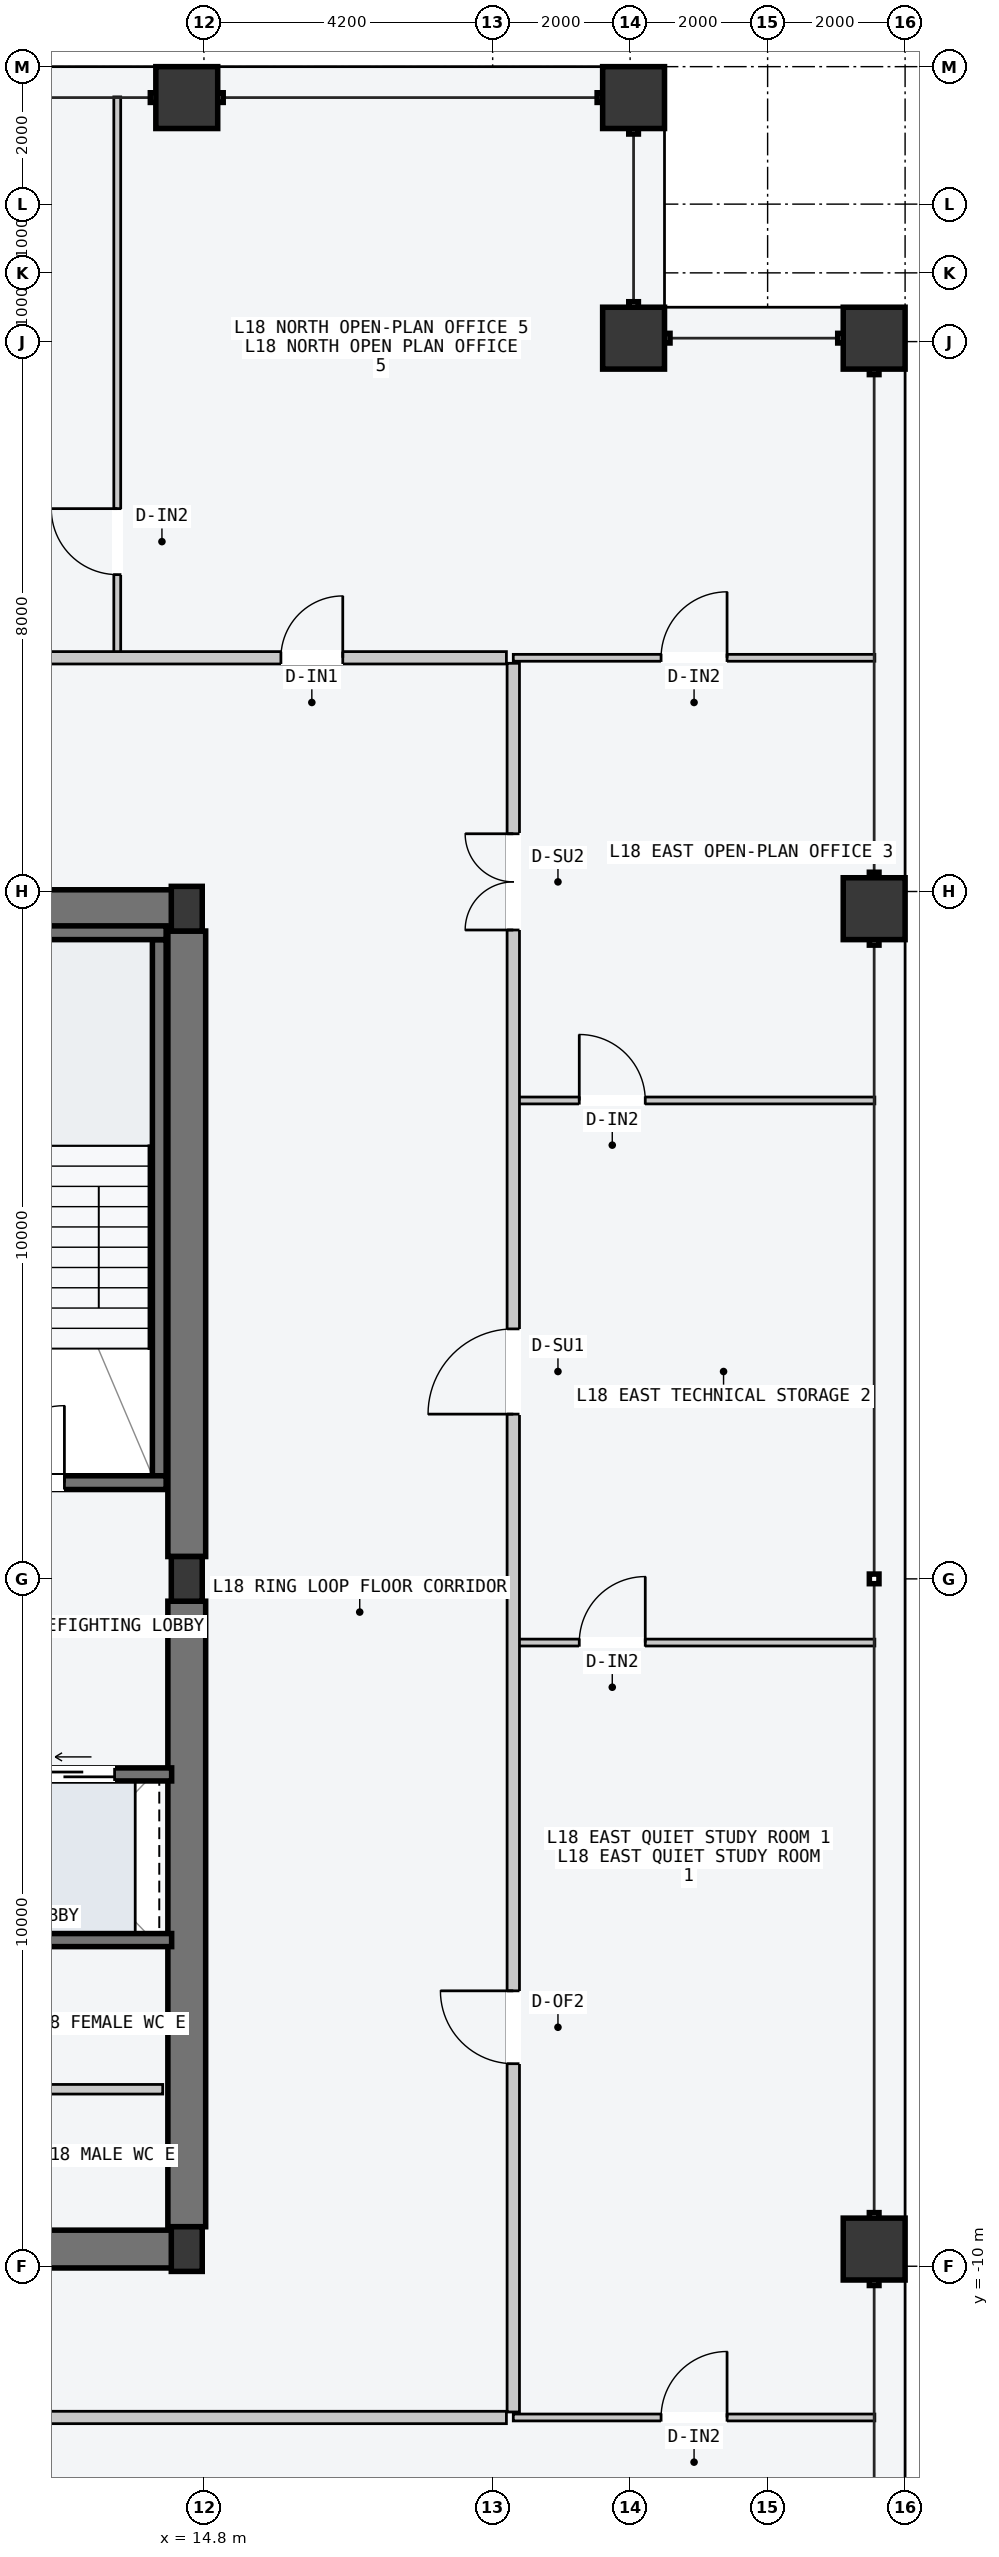
"""IFC4 building model, lengths in metres.
Left out: names, types, materials, properties, quantities, classifications, styles, units other than length and angle.
Written with IfcOpenShell. Run it as: python <this file> out.ifc"""

import sys

from ifc_helpers import new_model, si_unit, direction, frame, frame_2d, origin, origin_2d, place, context, subcontext, project, spatial, rectangle, hollow_rectangle, i_section, extrude, element, fill, save


model = new_model("IFC4")
c1 = context("Model", 3, precision=1e-05, world=origin(), true_north=direction((0.0, 1.0)))
c2 = subcontext(c1, "Body", "Model", "MODEL_VIEW")
j1 = project(units=[si_unit("LENGTHUNIT", "METRE"), si_unit("PLANEANGLEUNIT", "RADIAN")], contexts=[c1])
p1 = place(None, origin())
s1 = spatial("IfcSite", under=j1, at=p1, CompositionType="ELEMENT")
p2 = place(p1, origin())
s2 = spatial("IfcBuilding", under=s1, at=p2, CompositionType="ELEMENT")
p3 = place(p2, frame((0.0, 0.0, 70.8)))
s3 = spatial("IfcBuildingStorey", under=s2, at=p3, CompositionType="ELEMENT", Elevation=70.8)
for number, where, z_axis, x_axis in (
    (1, (8.07, -9.75, -0.2), (0.0, 0.0, 1.0), (1.0, 0.0, 0.0)),
    (2, (8.07, 9.75, -0.2), (0.0, 0.0, 1.0), (1.0, 0.0, 0.0)),
):
    element("IfcWall", number, at=place(p3, frame(where, z_axis=z_axis, x_axis=x_axis)), inside=s3, PredefinedType="SHEAR", context=c2, shape_type="SweptSolid", body=[
        extrude(rectangle(XDim=6.46, YDim=0.55, at=frame_2d((3.23, 0.0))), origin(), (0.0, 0.0, 1.0), 3.6),
    ])
for number, where, z_axis, x_axis in (
    (3, (14.55, -9.425, -0.2), (0.0, 0.0, 1.0), (0.0, 1.0, 0.0)),
    (4, (14.55, 0.325, -0.2), (0.0, 0.0, 1.0), (0.0, 1.0, 0.0)),
):
    element("IfcWall", number, at=place(p3, frame(where, z_axis=z_axis, x_axis=x_axis)), inside=s3, PredefinedType="SHEAR", context=c2, shape_type="SweptSolid", body=[
        extrude(rectangle(XDim=9.1, YDim=0.55, at=frame_2d((4.55, 0.0))), origin(), (0.0, 0.0, 1.0), 3.6),
    ])
p4 = place(p3, frame((14.15, 1.5, -0.2), z_axis=(0.0, 0.0, 1.0), x_axis=(0.0, 1.0, 0.0)))
e5 = element("IfcWall", 5, at=p4, inside=s3, PredefinedType="SOLIDWALL", context=c2, shape_type="SweptSolid", body=[
    extrude(rectangle(XDim=7.8, YDim=0.2, at=frame_2d((3.9, 0.0))), origin(), (0.0, 0.0, 1.0), 3.6),
])
p5 = place(p3, frame((10.15, 1.4, -0.2), z_axis=(0.0, 0.0, 1.0), x_axis=(1.0, 0.0, 0.0)))
e6 = element("IfcWall", 6, at=p5, inside=s3, PredefinedType="SOLIDWALL", context=c2, shape_type="SweptSolid", body=[
    extrude(rectangle(XDim=4.1, YDim=0.2, at=frame_2d((2.05, 0.0))), origin(), (0.0, 0.0, 1.0), 3.6),
])
p6 = place(p5, frame((1.5, 0.0, 0.2)))
e7 = element("IfcOpeningElement", 7, at=p6, cuts=e6, PredefinedType="OPENING", context=c2, shape_type="SweptSolid", body=[
    extrude(rectangle(XDim=1.12, YDim=2.18, at=frame_2d((0.56, 1.09))), frame((0.0, 0.11, 0.0), z_axis=(0.0, -1.0, 0.0), x_axis=(1.0, 0.0, 0.0)), (0.0, 0.0, 1.0), 0.22),
])
p7 = place(p3, frame((10.15, 9.4, -0.2), z_axis=(0.0, 0.0, 1.0), x_axis=(1.0, 0.0, 0.0)))
e8 = element("IfcWall", 8, at=p7, inside=s3, PredefinedType="SOLIDWALL", context=c2, shape_type="SweptSolid", body=[
    extrude(rectangle(XDim=4.1, YDim=0.2, at=frame_2d((2.05, 0.0))), origin(), (0.0, 0.0, 1.0), 3.6),
])
for number, where, z_axis, x_axis in (
    (9, (14.55, -9.75, 0.0), (0.0, 0.0, 1.0), (1.0, 0.0, 0.0)),
    (10, (14.55, 0.0, 0.0), (0.0, 0.0, 1.0), (1.0, 0.0, 0.0)),
    (11, (14.55, 9.75, 0.0), (0.0, 0.0, 1.0), (1.0, 0.0, 0.0)),
):
    element("IfcColumn", number, at=place(p3, frame(where, z_axis=z_axis, x_axis=x_axis)), inside=s3, PredefinedType="COLUMN", context=c2, shape_type="SweptSolid", body=[
        extrude(i_section(OverallWidth=0.45, OverallDepth=0.65, WebThickness=0.025, FlangeThickness=0.04, at=origin_2d()), origin(), (0.0, 0.0, 1.0), 3.6),
    ])
for number, where, z_axis, x_axis in (
    (12, (14.55, 21.55, 0.0), (0.0, 0.0, 1.0), (1.0, 0.0, 0.0)),
    (13, (21.05, 21.55, 0.0), (0.0, 0.0, 1.0), (1.0, 0.0, 0.0)),
    (14, (24.55, -9.75, 0.0), (0.0, 0.0, 1.0), (0.0, 1.0, 0.0)),
    (15, (24.55, 9.75, 0.0), (0.0, 0.0, 1.0), (0.0, 1.0, 0.0)),
    (16, (24.55, 18.05, 0.0), (0.0, 0.0, 1.0), (0.0, 1.0, 0.0)),
    (17, (21.05, 18.05, 0.0), (0.0, 0.0, 1.0), (1.0, 0.0, 0.0)),
):
    element("IfcColumn", number, at=place(p3, frame(where, z_axis=z_axis, x_axis=x_axis)), inside=s3, PredefinedType="COLUMN", context=c2, shape_type="SweptSolid", body=[
        extrude(hollow_rectangle(XDim=0.9, YDim=0.9, WallThickness=0.045, at=origin_2d()), origin(), (0.0, 0.0, 1.0), 3.6),
    ])
p8 = place(p3, frame((11.65, -2.845, -0.2), z_axis=(0.0, 0.0, 1.0), x_axis=(1.0, 0.0, 0.0)))
e18 = element("IfcWall", 18, at=p8, inside=s3, PredefinedType="SOLIDWALL", context=c2, shape_type="SweptSolid", body=[
    extrude(rectangle(XDim=2.68, YDim=0.19, at=frame_2d((1.34, 0.0))), origin(), (0.0, 0.0, 1.0), 3.6),
])
p9 = place(p8, frame((0.65, 0.0, 0.2)))
e19 = element("IfcOpeningElement", 19, at=p9, cuts=e18, PredefinedType="OPENING", context=c2, shape_type="SweptSolid", body=[
    extrude(rectangle(XDim=1.2, YDim=2.2, at=frame_2d((0.6, 1.1))), frame((0.0, 0.105, 0.0), z_axis=(0.0, -1.0, 0.0), x_axis=(1.0, 0.0, 0.0)), (0.0, 0.0, 1.0), 0.21),
])
p10 = place(p3, frame((11.65, -5.255, -0.2), z_axis=(0.0, 0.0, 1.0), x_axis=(1.0, 0.0, 0.0)))
e20 = element("IfcWall", 20, at=p10, inside=s3, PredefinedType="SOLIDWALL", context=c2, shape_type="SweptSolid", body=[
    extrude(rectangle(XDim=2.68, YDim=0.19, at=frame_2d((1.34, 0.0))), origin(), (0.0, 0.0, 1.0), 3.6),
])
p11 = place(p3, frame((11.7, -7.425, 0.0), z_axis=(0.0, 0.0, 1.0), x_axis=(1.0, 0.0, 0.0)))
e21 = element("IfcWall", 21, at=p11, inside=s3, PredefinedType="PARTITIONING", context=c2, shape_type="SweptSolid", body=[
    extrude(rectangle(XDim=2.5, YDim=0.14, at=frame_2d((1.25, 0.0))), origin(), (0.0, 0.0, 1.0), 3.4),
])
p12 = place(p3, frame((13.539, 13.46, 0.0), z_axis=(0.0, 0.0, 1.0), x_axis=(0.0, 1.0, 0.0)))
e22 = element("IfcWall", 22, at=p12, inside=s3, PredefinedType="PARTITIONING", context=c2, shape_type="SweptSolid", body=[
    extrude(rectangle(XDim=8.1, YDim=0.1, at=frame_2d((4.05, 0.0))), origin(), (0.0, 0.0, 1.0), 3.4),
])
p13 = place(p12, frame((1.15, 0.0, 0.0)))
e23 = element("IfcOpeningElement", 23, at=p13, cuts=e22, PredefinedType="OPENING", context=c2, shape_type="SweptSolid", body=[
    extrude(rectangle(XDim=0.96, YDim=2.18, at=frame_2d((0.48, 1.09))), frame((0.0, 0.06, 0.0), z_axis=(0.0, -1.0, 0.0), x_axis=(1.0, 0.0, 0.0)), (0.0, 0.0, 1.0), 0.12),
])
p14 = place(p3, frame((-19.2, 13.4, 0.0), z_axis=(0.0, 0.0, 1.0), x_axis=(1.0, 0.0, 0.0)))
e24 = element("IfcWall", 24, at=p14, inside=s3, PredefinedType="PARTITIONING", context=c2, shape_type="SweptSolid", body=[
    extrude(rectangle(XDim=38.4, YDim=0.18, at=frame_2d((19.2, 0.0))), origin(), (0.0, 0.0, 1.0), 3.4),
])
p15 = place(p14, frame((4.113, 0.0, 0.0)))
e25 = element("IfcOpeningElement", 25, at=p15, cuts=e24, PredefinedType="OPENING", context=c2, shape_type="SweptSolid", body=[
    extrude(rectangle(XDim=1.02, YDim=2.2, at=frame_2d((0.51, 1.1))), frame((0.0, 0.1, 0.0), z_axis=(0.0, -1.0, 0.0), x_axis=(1.0, 0.0, 0.0)), (0.0, 0.0, 1.0), 0.2),
])
p16 = place(p14, frame((13.095, 0.0, 0.0)))
e26 = element("IfcOpeningElement", 26, at=p16, cuts=e24, PredefinedType="OPENING", context=c2, shape_type="SweptSolid", body=[
    extrude(rectangle(XDim=1.06, YDim=2.2, at=frame_2d((0.53, 1.1))), frame((0.0, 0.1, 0.0), z_axis=(0.0, -1.0, 0.0), x_axis=(1.0, 0.0, 0.0)), (0.0, 0.0, 1.0), 0.2),
])
p17 = place(p14, frame((21.168, 0.0, 0.0)))
e27 = element("IfcOpeningElement", 27, at=p17, cuts=e24, PredefinedType="OPENING", context=c2, shape_type="SweptSolid", body=[
    extrude(rectangle(XDim=1.24, YDim=2.24, at=frame_2d((0.62, 1.12))), frame((0.0, 0.1, 0.0), z_axis=(0.0, -1.0, 0.0), x_axis=(1.0, 0.0, 0.0)), (0.0, 0.0, 1.0), 0.2),
])
p18 = place(p14, frame((28.455, 0.0, 0.0)))
e28 = element("IfcOpeningElement", 28, at=p18, cuts=e24, PredefinedType="OPENING", context=c2, shape_type="SweptSolid", body=[
    extrude(rectangle(XDim=1.4, YDim=2.2, at=frame_2d((0.7, 1.1))), frame((0.0, 0.1, 0.0), z_axis=(0.0, -1.0, 0.0), x_axis=(1.0, 0.0, 0.0)), (0.0, 0.0, 1.0), 0.2),
])
p19 = place(p14, frame((35.119, 0.0, 0.0)))
e29 = element("IfcOpeningElement", 29, at=p19, cuts=e24, PredefinedType="OPENING", context=c2, shape_type="SweptSolid", body=[
    extrude(rectangle(XDim=0.9, YDim=2.15, at=frame_2d((0.45, 1.075))), frame((0.0, 0.1, 0.0), z_axis=(0.0, -1.0, 0.0), x_axis=(1.0, 0.0, 0.0)), (0.0, 0.0, 1.0), 0.2),
])
p20 = place(p3, frame((19.3, 13.4, 0.0), z_axis=(0.0, 0.0, 1.0), x_axis=(1.0, 0.0, 0.0)))
e30 = element("IfcWall", 30, at=p20, inside=s3, PredefinedType="PARTITIONING", context=c2, shape_type="SweptSolid", body=[
    extrude(rectangle(XDim=5.26, YDim=0.1, at=frame_2d((2.63, 0.0))), origin(), (0.0, 0.0, 1.0), 3.4),
])
p21 = place(p20, frame((2.15, 0.0, 0.0)))
e31 = element("IfcOpeningElement", 31, at=p21, cuts=e30, PredefinedType="OPENING", context=c2, shape_type="SweptSolid", body=[
    extrude(rectangle(XDim=0.96, YDim=2.18, at=frame_2d((0.48, 1.09))), frame((0.0, 0.06, 0.0), z_axis=(0.0, -1.0, 0.0), x_axis=(1.0, 0.0, 0.0)), (0.0, 0.0, 1.0), 0.12),
])
p22 = place(p3, frame((-19.2, -12.2, 0.0), z_axis=(0.0, 0.0, 1.0), x_axis=(1.0, 0.0, 0.0)))
e32 = element("IfcWall", 32, at=p22, inside=s3, PredefinedType="PARTITIONING", context=c2, shape_type="SweptSolid", body=[
    extrude(rectangle(XDim=38.4, YDim=0.18, at=frame_2d((19.2, 0.0))), origin(), (0.0, 0.0, 1.0), 3.4),
])
p23 = place(p22, frame((7.307, 0.0, 0.0)))
e33 = element("IfcOpeningElement", 33, at=p23, cuts=e32, PredefinedType="OPENING", context=c2, shape_type="SweptSolid", body=[
    extrude(rectangle(XDim=1.4, YDim=2.2, at=frame_2d((0.7, 1.1))), frame((0.0, 0.1, 0.0), z_axis=(0.0, -1.0, 0.0), x_axis=(1.0, 0.0, 0.0)), (0.0, 0.0, 1.0), 0.2),
])
p24 = place(p22, frame((26.757, 0.0, 0.0)))
e34 = element("IfcOpeningElement", 34, at=p24, cuts=e32, PredefinedType="OPENING", context=c2, shape_type="SweptSolid", body=[
    extrude(rectangle(XDim=0.9, YDim=2.15, at=frame_2d((0.45, 1.075))), frame((0.0, 0.1, 0.0), z_axis=(0.0, -1.0, 0.0), x_axis=(1.0, 0.0, 0.0)), (0.0, 0.0, 1.0), 0.2),
])
p25 = place(p3, frame((19.3, -12.2, 0.0), z_axis=(0.0, 0.0, 1.0), x_axis=(1.0, 0.0, 0.0)))
e35 = element("IfcWall", 35, at=p25, inside=s3, PredefinedType="PARTITIONING", context=c2, shape_type="SweptSolid", body=[
    extrude(rectangle(XDim=5.26, YDim=0.1, at=frame_2d((2.63, 0.0))), origin(), (0.0, 0.0, 1.0), 3.4),
])
p26 = place(p25, frame((2.15, 0.0, 0.0)))
e36 = element("IfcOpeningElement", 36, at=p26, cuts=e35, PredefinedType="OPENING", context=c2, shape_type="SweptSolid", body=[
    extrude(rectangle(XDim=0.96, YDim=2.18, at=frame_2d((0.48, 1.09))), frame((0.0, 0.06, 0.0), z_axis=(0.0, -1.0, 0.0), x_axis=(1.0, 0.0, 0.0)), (0.0, 0.0, 1.0), 0.12),
])
p27 = place(p3, frame((19.36, -0.927, 0.0), z_axis=(0.0, 0.0, 1.0), x_axis=(1.0, 0.0, 0.0)))
e37 = element("IfcWall", 37, at=p27, inside=s3, PredefinedType="PARTITIONING", context=c2, shape_type="SweptSolid", body=[
    extrude(rectangle(XDim=5.2, YDim=0.1, at=frame_2d((2.6, 0.0))), origin(), (0.0, 0.0, 1.0), 3.4),
])
p28 = place(p27, frame((0.9, 0.0, 0.0)))
e38 = element("IfcOpeningElement", 38, at=p28, cuts=e37, PredefinedType="OPENING", context=c2, shape_type="SweptSolid", body=[
    extrude(rectangle(XDim=0.96, YDim=2.18, at=frame_2d((0.48, 1.09))), frame((0.0, 0.06, 0.0), z_axis=(0.0, -1.0, 0.0), x_axis=(1.0, 0.0, 0.0)), (0.0, 0.0, 1.0), 0.12),
])
p29 = place(p3, frame((19.36, 6.96, 0.0), z_axis=(0.0, 0.0, 1.0), x_axis=(1.0, 0.0, 0.0)))
e39 = element("IfcWall", 39, at=p29, inside=s3, PredefinedType="PARTITIONING", context=c2, shape_type="SweptSolid", body=[
    extrude(rectangle(XDim=5.2, YDim=0.1, at=frame_2d((2.6, 0.0))), origin(), (0.0, 0.0, 1.0), 3.4),
])
p30 = place(p29, frame((0.9, 0.0, 0.0)))
e40 = element("IfcOpeningElement", 40, at=p30, cuts=e39, PredefinedType="OPENING", context=c2, shape_type="SweptSolid", body=[
    extrude(rectangle(XDim=0.96, YDim=2.18, at=frame_2d((0.48, 1.09))), frame((0.0, 0.06, 0.0), z_axis=(0.0, -1.0, 0.0), x_axis=(1.0, 0.0, 0.0)), (0.0, 0.0, 1.0), 0.12),
])
p31 = place(p3, frame((19.3, -12.12, 0.0), z_axis=(0.0, 0.0, 1.0), x_axis=(0.0, 1.0, 0.0)))
e41 = element("IfcWall", 41, at=p31, inside=s3, PredefinedType="PARTITIONING", context=c2, shape_type="SweptSolid", body=[
    extrude(rectangle(XDim=25.44, YDim=0.18, at=frame_2d((12.72, 0.0))), origin(), (0.0, 0.0, 1.0), 3.4),
])
p32 = place(p31, frame((5.067, 0.0, 0.0)))
e42 = element("IfcOpeningElement", 42, at=p32, cuts=e41, PredefinedType="OPENING", context=c2, shape_type="SweptSolid", body=[
    extrude(rectangle(XDim=1.06, YDim=2.2, at=frame_2d((0.53, 1.1))), frame((0.0, 0.1, 0.0), z_axis=(0.0, -1.0, 0.0), x_axis=(1.0, 0.0, 0.0)), (0.0, 0.0, 1.0), 0.2),
])
p33 = place(p31, frame((14.517, 0.0, 0.0)))
e43 = element("IfcOpeningElement", 43, at=p33, cuts=e41, PredefinedType="OPENING", context=c2, shape_type="SweptSolid", body=[
    extrude(rectangle(XDim=1.24, YDim=2.24, at=frame_2d((0.62, 1.12))), frame((0.0, 0.1, 0.0), z_axis=(0.0, -1.0, 0.0), x_axis=(1.0, 0.0, 0.0)), (0.0, 0.0, 1.0), 0.2),
])
p34 = place(p31, frame((21.56, 0.0, 0.0)))
e44 = element("IfcOpeningElement", 44, at=p34, cuts=e41, PredefinedType="OPENING", context=c2, shape_type="SweptSolid", body=[
    extrude(rectangle(XDim=1.4, YDim=2.2, at=frame_2d((0.7, 1.1))), frame((0.0, 0.1, 0.0), z_axis=(0.0, -1.0, 0.0), x_axis=(1.0, 0.0, 0.0)), (0.0, 0.0, 1.0), 0.2),
])
p35 = place(p6, origin())
e45 = element("IfcDoor", 45, at=p35, inside=s3, OperationType="SINGLE_SWING_RIGHT", PredefinedType="DOOR", context=c2, shape_type="SweptSolid", body=[
    extrude(rectangle(XDim=1.12, YDim=2.18, at=frame_2d((0.56, 1.09))), frame((0.0, 0.025, 0.0), z_axis=(0.0, -1.0, 0.0), x_axis=(1.0, 0.0, 0.0)), (0.0, 0.0, 1.0), 0.05),
])
fill(e7, e45)
p36 = place(p9, origin())
e46 = element("IfcDoor", 46, at=p36, inside=s3, OperationType="SLIDING_TO_LEFT", PredefinedType="DOOR", context=c2, shape_type="SweptSolid", body=[
    extrude(rectangle(XDim=1.2, YDim=2.2, at=frame_2d((0.6, 1.1))), frame((0.0, 0.025, 0.0), z_axis=(0.0, -1.0, 0.0), x_axis=(1.0, 0.0, 0.0)), (0.0, 0.0, 1.0), 0.05),
])
fill(e19, e46)
p37 = place(p13, origin())
e47 = element("IfcDoor", 47, at=p37, inside=s3, OperationType="SINGLE_SWING_RIGHT", PredefinedType="DOOR", context=c2, shape_type="SweptSolid", body=[
    extrude(rectangle(XDim=0.96, YDim=2.18, at=frame_2d((0.48, 1.09))), frame((0.0, 0.025, 0.0), z_axis=(0.0, -1.0, 0.0), x_axis=(1.0, 0.0, 0.0)), (0.0, 0.0, 1.0), 0.05),
])
fill(e23, e47)
p38 = place(p19, origin())
e48 = element("IfcDoor", 48, at=p38, inside=s3, OperationType="SINGLE_SWING_RIGHT", PredefinedType="DOOR", context=c2, shape_type="SweptSolid", body=[
    extrude(rectangle(XDim=0.9, YDim=2.15, at=frame_2d((0.45, 1.075))), frame((0.0, 0.025, 0.0), z_axis=(0.0, -1.0, 0.0), x_axis=(1.0, 0.0, 0.0)), (0.0, 0.0, 1.0), 0.05),
])
fill(e29, e48)
p39 = place(p21, origin())
e49 = element("IfcDoor", 49, at=p39, inside=s3, OperationType="SINGLE_SWING_RIGHT", PredefinedType="DOOR", context=c2, shape_type="SweptSolid", body=[
    extrude(rectangle(XDim=0.96, YDim=2.18, at=frame_2d((0.48, 1.09))), frame((0.0, 0.025, 0.0), z_axis=(0.0, -1.0, 0.0), x_axis=(1.0, 0.0, 0.0)), (0.0, 0.0, 1.0), 0.05),
])
fill(e31, e49)
p40 = place(p26, origin())
e50 = element("IfcDoor", 50, at=p40, inside=s3, OperationType="SINGLE_SWING_RIGHT", PredefinedType="DOOR", context=c2, shape_type="SweptSolid", body=[
    extrude(rectangle(XDim=0.96, YDim=2.18, at=frame_2d((0.48, 1.09))), frame((0.0, 0.025, 0.0), z_axis=(0.0, -1.0, 0.0), x_axis=(1.0, 0.0, 0.0)), (0.0, 0.0, 1.0), 0.05),
])
fill(e36, e50)
p41 = place(p28, origin())
e51 = element("IfcDoor", 51, at=p41, inside=s3, OperationType="SINGLE_SWING_RIGHT", PredefinedType="DOOR", context=c2, shape_type="SweptSolid", body=[
    extrude(rectangle(XDim=0.96, YDim=2.18, at=frame_2d((0.48, 1.09))), frame((0.0, 0.025, 0.0), z_axis=(0.0, -1.0, 0.0), x_axis=(1.0, 0.0, 0.0)), (0.0, 0.0, 1.0), 0.05),
])
fill(e38, e51)
p42 = place(p30, origin())
e52 = element("IfcDoor", 52, at=p42, inside=s3, OperationType="SINGLE_SWING_LEFT", PredefinedType="DOOR", context=c2, shape_type="SweptSolid", body=[
    extrude(rectangle(XDim=0.96, YDim=2.18, at=frame_2d((0.48, 1.09))), frame((0.0, 0.025, 0.0), z_axis=(0.0, -1.0, 0.0), x_axis=(1.0, 0.0, 0.0)), (0.0, 0.0, 1.0), 0.05),
])
fill(e40, e52)
p43 = place(p32, origin())
e53 = element("IfcDoor", 53, at=p43, inside=s3, OperationType="SINGLE_SWING_RIGHT", PredefinedType="DOOR", context=c2, shape_type="SweptSolid", body=[
    extrude(rectangle(XDim=1.06, YDim=2.2, at=frame_2d((0.53, 1.1))), frame((0.0, 0.025, 0.0), z_axis=(0.0, -1.0, 0.0), x_axis=(1.0, 0.0, 0.0)), (0.0, 0.0, 1.0), 0.05),
])
fill(e42, e53)
p44 = place(p33, origin())
e54 = element("IfcDoor", 54, at=p44, inside=s3, OperationType="SINGLE_SWING_LEFT", PredefinedType="DOOR", context=c2, shape_type="SweptSolid", body=[
    extrude(rectangle(XDim=1.24, YDim=2.24, at=frame_2d((0.62, 1.12))), frame((0.0, 0.025, 0.0), z_axis=(0.0, -1.0, 0.0), x_axis=(1.0, 0.0, 0.0)), (0.0, 0.0, 1.0), 0.05),
])
fill(e43, e54)
p45 = place(p34, origin())
e55 = element("IfcDoor", 55, at=p45, inside=s3, OperationType="DOUBLE_DOOR_SINGLE_SWING", PredefinedType="DOOR", context=c2, shape_type="SweptSolid", body=[
    extrude(rectangle(XDim=1.4, YDim=2.2, at=frame_2d((0.7, 1.1))), frame((0.0, 0.025, 0.0), z_axis=(0.0, -1.0, 0.0), x_axis=(1.0, 0.0, 0.0)), (0.0, 0.0, 1.0), 0.05),
])
fill(e44, e55)
save(model, sys.argv[1])
